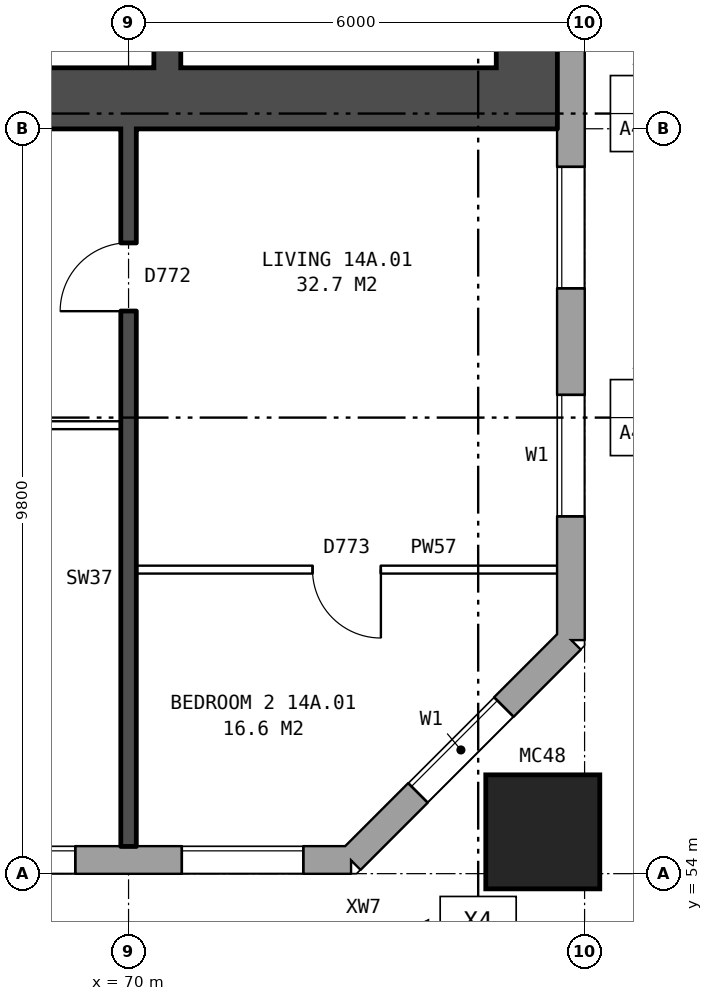
"""IFC4 building model, lengths in metres.
Left out: names, types, materials, properties, quantities, classifications, styles, units other than length and angle.
Written with IfcOpenShell. Run it as: python <this file> out.ifc"""

import sys

from ifc_helpers import new_model, si_unit, direction, frame, frame_2d, origin, origin_2d, place, context, subcontext, project, spatial, rectangle, hollow_rectangle, extrude, element, fill, save


model = new_model("IFC4")
c1 = context("Model", 3, precision=1e-05, world=origin(), true_north=direction((0.0, 1.0)))
c2 = subcontext(c1, "Body", "Model", "MODEL_VIEW")
j1 = project(units=[si_unit("LENGTHUNIT", "METRE"), si_unit("PLANEANGLEUNIT", "RADIAN")], contexts=[c1])
p1 = place(None, origin())
s1 = spatial("IfcSite", under=j1, at=p1, CompositionType="ELEMENT")
p2 = place(p1, origin())
s2 = spatial("IfcBuilding", under=s1, at=p2, CompositionType="ELEMENT")
p3 = place(p2, frame((0.0, 0.0, 53.6)))
s3 = spatial("IfcBuildingStorey", under=s2, at=p3, CompositionType="ELEMENT", Elevation=53.6)
p4 = place(p3, frame((75.45, 54.55, 0.0), z_axis=(0.0, 0.0, 1.0), x_axis=(1.0, 0.0, 0.0)))
e1 = element("IfcColumn", 1, at=p4, inside=s3, PredefinedType="COLUMN", context=c2, shape_type="SweptSolid", body=[
    extrude(hollow_rectangle(XDim=1.5, YDim=1.5, WallThickness=0.08, at=origin_2d()), origin(), (0.0, 0.0, 1.0), 3.1),
])
p5 = place(p3, frame((24.575, 54.18, 0.0), z_axis=(0.0, 0.0, 1.0), x_axis=(1.0, 0.0, 0.0)))
e2 = element("IfcWall", 2, at=p5, inside=s3, PredefinedType="STANDARD", context=c2, shape_type="SweptSolid", body=[
    extrude(rectangle(XDim=48.351, YDim=0.36, at=frame_2d((24.175, 0.0))), origin(), (0.0, 0.0, 1.0), 2.85),
])
p6 = place(p5, frame((1.125, 0.0, 0.8)))
e3 = element("IfcOpeningElement", 3, at=p6, cuts=e2, PredefinedType="OPENING", context=c2, shape_type="SweptSolid", body=[
    extrude(rectangle(XDim=1.6, YDim=1.8, at=frame_2d((0.8, 0.9))), frame((0.0, 0.19, 0.0), z_axis=(0.0, -1.0, 0.0), x_axis=(1.0, 0.0, 0.0)), (0.0, 0.0, 1.0), 0.38),
])
p7 = place(p5, frame((4.125, 0.0, 0.8)))
e4 = element("IfcOpeningElement", 4, at=p7, cuts=e2, PredefinedType="OPENING", context=c2, shape_type="SweptSolid", body=[
    extrude(rectangle(XDim=1.6, YDim=1.8, at=frame_2d((0.8, 0.9))), frame((0.0, 0.19, 0.0), z_axis=(0.0, -1.0, 0.0), x_axis=(1.0, 0.0, 0.0)), (0.0, 0.0, 1.0), 0.38),
])
p8 = place(p5, frame((7.125, 0.0, 0.8)))
e5 = element("IfcOpeningElement", 5, at=p8, cuts=e2, PredefinedType="OPENING", context=c2, shape_type="SweptSolid", body=[
    extrude(rectangle(XDim=1.6, YDim=1.8, at=frame_2d((0.8, 0.9))), frame((0.0, 0.19, 0.0), z_axis=(0.0, -1.0, 0.0), x_axis=(1.0, 0.0, 0.0)), (0.0, 0.0, 1.0), 0.38),
])
p9 = place(p5, frame((10.125, 0.0, 0.8)))
e6 = element("IfcOpeningElement", 6, at=p9, cuts=e2, PredefinedType="OPENING", context=c2, shape_type="SweptSolid", body=[
    extrude(rectangle(XDim=1.6, YDim=1.8, at=frame_2d((0.8, 0.9))), frame((0.0, 0.19, 0.0), z_axis=(0.0, -1.0, 0.0), x_axis=(1.0, 0.0, 0.0)), (0.0, 0.0, 1.0), 0.38),
])
p10 = place(p5, frame((12.025, 0.0, 1.7)))
e7 = element("IfcOpeningElement", 7, at=p10, cuts=e2, PredefinedType="OPENING", context=c2, shape_type="SweptSolid", body=[
    extrude(rectangle(XDim=0.8, YDim=0.9, at=frame_2d((0.4, 0.45))), frame((0.0, 0.19, 0.0), z_axis=(0.0, -1.0, 0.0), x_axis=(1.0, 0.0, 0.0)), (0.0, 0.0, 1.0), 0.38),
])
p11 = place(p5, frame((16.125, 0.0, 0.8)))
e8 = element("IfcOpeningElement", 8, at=p11, cuts=e2, PredefinedType="OPENING", context=c2, shape_type="SweptSolid", body=[
    extrude(rectangle(XDim=1.6, YDim=1.8, at=frame_2d((0.8, 0.9))), frame((0.0, 0.19, 0.0), z_axis=(0.0, -1.0, 0.0), x_axis=(1.0, 0.0, 0.0)), (0.0, 0.0, 1.0), 0.38),
])
p12 = place(p5, frame((19.125, 0.0, 0.8)))
e9 = element("IfcOpeningElement", 9, at=p12, cuts=e2, PredefinedType="OPENING", context=c2, shape_type="SweptSolid", body=[
    extrude(rectangle(XDim=1.6, YDim=1.8, at=frame_2d((0.8, 0.9))), frame((0.0, 0.19, 0.0), z_axis=(0.0, -1.0, 0.0), x_axis=(1.0, 0.0, 0.0)), (0.0, 0.0, 1.0), 0.38),
])
p13 = place(p5, frame((22.125, 0.0, 0.8)))
e10 = element("IfcOpeningElement", 10, at=p13, cuts=e2, PredefinedType="OPENING", context=c2, shape_type="SweptSolid", body=[
    extrude(rectangle(XDim=1.6, YDim=1.8, at=frame_2d((0.8, 0.9))), frame((0.0, 0.19, 0.0), z_axis=(0.0, -1.0, 0.0), x_axis=(1.0, 0.0, 0.0)), (0.0, 0.0, 1.0), 0.38),
])
p14 = place(p5, frame((25.125, 0.0, 0.8)))
e11 = element("IfcOpeningElement", 11, at=p14, cuts=e2, PredefinedType="OPENING", context=c2, shape_type="SweptSolid", body=[
    extrude(rectangle(XDim=1.6, YDim=1.8, at=frame_2d((0.8, 0.9))), frame((0.0, 0.19, 0.0), z_axis=(0.0, -1.0, 0.0), x_axis=(1.0, 0.0, 0.0)), (0.0, 0.0, 1.0), 0.38),
])
p15 = place(p5, frame((28.125, 0.0, 0.8)))
e12 = element("IfcOpeningElement", 12, at=p15, cuts=e2, PredefinedType="OPENING", context=c2, shape_type="SweptSolid", body=[
    extrude(rectangle(XDim=1.6, YDim=1.8, at=frame_2d((0.8, 0.9))), frame((0.0, 0.19, 0.0), z_axis=(0.0, -1.0, 0.0), x_axis=(1.0, 0.0, 0.0)), (0.0, 0.0, 1.0), 0.38),
])
p16 = place(p5, frame((31.125, 0.0, 0.8)))
e13 = element("IfcOpeningElement", 13, at=p16, cuts=e2, PredefinedType="OPENING", context=c2, shape_type="SweptSolid", body=[
    extrude(rectangle(XDim=1.6, YDim=1.8, at=frame_2d((0.8, 0.9))), frame((0.0, 0.19, 0.0), z_axis=(0.0, -1.0, 0.0), x_axis=(1.0, 0.0, 0.0)), (0.0, 0.0, 1.0), 0.38),
])
p17 = place(p5, frame((33.625, 0.0, 0.15)))
e14 = element("IfcOpeningElement", 14, at=p17, cuts=e2, PredefinedType="OPENING", context=c2, shape_type="SweptSolid", body=[
    extrude(rectangle(XDim=1.4, YDim=0.9, at=frame_2d((0.7, 0.45))), frame((0.0, 0.19, 0.0), z_axis=(0.0, -1.0, 0.0), x_axis=(1.0, 0.0, 0.0)), (0.0, 0.0, 1.0), 0.38),
])
p18 = place(p5, frame((37.125, 0.0, 0.8)))
e15 = element("IfcOpeningElement", 15, at=p18, cuts=e2, PredefinedType="OPENING", context=c2, shape_type="SweptSolid", body=[
    extrude(rectangle(XDim=1.6, YDim=1.8, at=frame_2d((0.8, 0.9))), frame((0.0, 0.19, 0.0), z_axis=(0.0, -1.0, 0.0), x_axis=(1.0, 0.0, 0.0)), (0.0, 0.0, 1.0), 0.38),
])
p19 = place(p5, frame((40.125, 0.0, 0.8)))
e16 = element("IfcOpeningElement", 16, at=p19, cuts=e2, PredefinedType="OPENING", context=c2, shape_type="SweptSolid", body=[
    extrude(rectangle(XDim=1.6, YDim=1.8, at=frame_2d((0.8, 0.9))), frame((0.0, 0.19, 0.0), z_axis=(0.0, -1.0, 0.0), x_axis=(1.0, 0.0, 0.0)), (0.0, 0.0, 1.0), 0.38),
])
p20 = place(p5, frame((43.125, 0.0, 0.8)))
e17 = element("IfcOpeningElement", 17, at=p20, cuts=e2, PredefinedType="OPENING", context=c2, shape_type="SweptSolid", body=[
    extrude(rectangle(XDim=1.6, YDim=1.8, at=frame_2d((0.8, 0.9))), frame((0.0, 0.19, 0.0), z_axis=(0.0, -1.0, 0.0), x_axis=(1.0, 0.0, 0.0)), (0.0, 0.0, 1.0), 0.38),
])
p21 = place(p5, frame((46.125, 0.0, 0.8)))
e18 = element("IfcOpeningElement", 18, at=p21, cuts=e2, PredefinedType="OPENING", context=c2, shape_type="SweptSolid", body=[
    extrude(rectangle(XDim=1.6, YDim=1.8, at=frame_2d((0.8, 0.9))), frame((0.0, 0.19, 0.0), z_axis=(0.0, -1.0, 0.0), x_axis=(1.0, 0.0, 0.0)), (0.0, 0.0, 1.0), 0.38),
])
p22 = place(p5, frame((14.325, 0.0, 0.8)))
e19 = element("IfcOpeningElement", 19, at=p22, cuts=e2, PredefinedType="OPENING", context=c2, shape_type="SweptSolid", body=[
    extrude(rectangle(XDim=0.8, YDim=0.9, at=frame_2d((0.4, 0.45))), frame((0.0, 0.19, 0.0), z_axis=(0.0, -1.0, 0.0), x_axis=(1.0, 0.0, 0.0)), (0.0, 0.0, 1.0), 0.38),
])
p23 = place(p5, frame((35.525, 0.0, 1.65)))
e20 = element("IfcOpeningElement", 20, at=p23, cuts=e2, PredefinedType="OPENING", context=c2, shape_type="SweptSolid", body=[
    extrude(rectangle(XDim=0.6, YDim=0.9, at=frame_2d((0.3, 0.45))), frame((0.0, 0.19, 0.0), z_axis=(0.0, -1.0, 0.0), x_axis=(1.0, 0.0, 0.0)), (0.0, 0.0, 1.0), 0.38),
])
p24 = place(p3, frame((72.925, 54.18, 0.0), z_axis=(0.0, 0.0, 1.0), x_axis=(0.707106781187, 0.707106781187, 0.0)))
e21 = element("IfcWall", 21, at=p24, inside=s3, PredefinedType="STANDARD", context=c2, shape_type="SweptSolid", body=[
    extrude(rectangle(XDim=4.094, YDim=0.36, at=frame_2d((2.047, 0.0))), origin(), (0.0, 0.0, 1.0), 2.85),
])
p25 = place(p24, frame((1.247, 0.0, 0.8)))
e22 = element("IfcOpeningElement", 22, at=p25, cuts=e21, PredefinedType="OPENING", context=c2, shape_type="SweptSolid", body=[
    extrude(rectangle(XDim=1.6, YDim=1.8, at=frame_2d((0.8, 0.9))), frame((0.0, 0.19, 0.0), z_axis=(0.0, -1.0, 0.0), x_axis=(1.0, 0.0, 0.0)), (0.0, 0.0, 1.0), 0.38),
])
p26 = place(p3, frame((75.82, 57.075, 0.0), z_axis=(0.0, 0.0, 1.0), x_axis=(0.0, 1.0, 0.0)))
e23 = element("IfcWall", 23, at=p26, inside=s3, PredefinedType="STANDARD", context=c2, shape_type="SweptSolid", body=[
    extrude(rectangle(XDim=25.851, YDim=0.36, at=frame_2d((12.925, 0.0))), origin(), (0.0, 0.0, 1.0), 2.85),
])
p27 = place(p26, frame((1.625, 0.0, 0.8)))
e24 = element("IfcOpeningElement", 24, at=p27, cuts=e23, PredefinedType="OPENING", context=c2, shape_type="SweptSolid", body=[
    extrude(rectangle(XDim=1.6, YDim=1.8, at=frame_2d((0.8, 0.9))), frame((0.0, 0.19, 0.0), z_axis=(0.0, -1.0, 0.0), x_axis=(1.0, 0.0, 0.0)), (0.0, 0.0, 1.0), 0.38),
])
p28 = place(p26, frame((4.625, 0.0, 0.8)))
e25 = element("IfcOpeningElement", 25, at=p28, cuts=e23, PredefinedType="OPENING", context=c2, shape_type="SweptSolid", body=[
    extrude(rectangle(XDim=1.6, YDim=1.8, at=frame_2d((0.8, 0.9))), frame((0.0, 0.19, 0.0), z_axis=(0.0, -1.0, 0.0), x_axis=(1.0, 0.0, 0.0)), (0.0, 0.0, 1.0), 0.38),
])
p29 = place(p26, frame((19.625, 0.0, 0.8)))
e26 = element("IfcOpeningElement", 26, at=p29, cuts=e23, PredefinedType="OPENING", context=c2, shape_type="SweptSolid", body=[
    extrude(rectangle(XDim=1.6, YDim=1.8, at=frame_2d((0.8, 0.9))), frame((0.0, 0.19, 0.0), z_axis=(0.0, -1.0, 0.0), x_axis=(1.0, 0.0, 0.0)), (0.0, 0.0, 1.0), 0.38),
])
p30 = place(p26, frame((22.625, 0.0, 0.8)))
e27 = element("IfcOpeningElement", 27, at=p30, cuts=e23, PredefinedType="OPENING", context=c2, shape_type="SweptSolid", body=[
    extrude(rectangle(XDim=1.6, YDim=1.8, at=frame_2d((0.8, 0.9))), frame((0.0, 0.19, 0.0), z_axis=(0.0, -1.0, 0.0), x_axis=(1.0, 0.0, 0.0)), (0.0, 0.0, 1.0), 0.38),
])
p31 = place(p3, frame((75.24, 64.6, 0.0), z_axis=(0.0, 0.0, 1.0), x_axis=(0.0, 1.0, 0.0)))
e28 = element("IfcWall", 28, at=p31, inside=s3, PredefinedType="SHEAR", context=c2, shape_type="SweptSolid", body=[
    extrude(rectangle(XDim=10.8, YDim=0.8, at=frame_2d((5.4, 0.0))), origin(), (0.0, 0.0, 1.0), 2.85),
])
p32 = place(p3, frame((66.64, 64.2, 0.0), z_axis=(0.0, 0.0, 1.0), x_axis=(1.0, 0.0, 0.0)))
e29 = element("IfcWall", 29, at=p32, inside=s3, PredefinedType="SHEAR", context=c2, shape_type="SweptSolid", body=[
    extrude(rectangle(XDim=9.0, YDim=0.8, at=frame_2d((4.5, 0.0))), origin(), (0.0, 0.0, 1.0), 2.85),
])
p33 = place(p3, frame((70.51, 64.6, 0.0), z_axis=(0.0, 0.0, 1.0), x_axis=(0.0, 1.0, 0.0)))
e30 = element("IfcWall", 30, at=p33, inside=s3, PredefinedType="SHEAR", context=c2, shape_type="SweptSolid", body=[
    extrude(rectangle(XDim=2.075, YDim=0.35, at=frame_2d((1.038, 0.0))), origin(), (0.0, 0.0, 1.0), 2.85),
])
p34 = place(p3, frame((70.1, 58.0, 0.0), z_axis=(0.0, 0.0, 1.0), x_axis=(1.0, 0.0, 0.0)))
e31 = element("IfcWall", 31, at=p34, inside=s3, PredefinedType="PARTITIONING", context=c2, shape_type="SweptSolid", body=[
    extrude(rectangle(XDim=5.54, YDim=0.1, at=frame_2d((2.77, 0.0))), origin(), (0.0, 0.0, 1.0), 2.85),
])
p35 = place(p34, frame((2.32, 0.0, 0.0)))
e32 = element("IfcOpeningElement", 32, at=p35, cuts=e31, PredefinedType="OPENING", context=c2, shape_type="SweptSolid", body=[
    extrude(rectangle(XDim=0.9, YDim=2.1, at=frame_2d((0.45, 1.05))), frame((0.0, 0.06, 0.0), z_axis=(0.0, -1.0, 0.0), x_axis=(1.0, 0.0, 0.0)), (0.0, 0.0, 1.0), 0.12),
])
p36 = place(p3, frame((64.1, 59.9, 0.0), z_axis=(0.0, 0.0, 1.0), x_axis=(1.0, 0.0, 0.0)))
e33 = element("IfcWall", 33, at=p36, inside=s3, PredefinedType="PARTITIONING", context=c2, shape_type="SweptSolid", body=[
    extrude(rectangle(XDim=5.8, YDim=0.1, at=frame_2d((2.9, 0.0))), origin(), (0.0, 0.0, 1.0), 2.85),
])
p37 = place(p36, frame((3.6, 0.0, 0.0)))
e34 = element("IfcOpeningElement", 34, at=p37, cuts=e33, PredefinedType="OPENING", context=c2, shape_type="SweptSolid", body=[
    extrude(rectangle(XDim=0.9, YDim=2.1, at=frame_2d((0.45, 1.05))), frame((0.0, 0.06, 0.0), z_axis=(0.0, -1.0, 0.0), x_axis=(1.0, 0.0, 0.0)), (0.0, 0.0, 1.0), 0.12),
])
p38 = place(p36, frame((0.7, 0.0, 0.0)))
e35 = element("IfcOpeningElement", 35, at=p38, cuts=e33, PredefinedType="OPENING", context=c2, shape_type="SweptSolid", body=[
    extrude(rectangle(XDim=0.9, YDim=2.1, at=frame_2d((0.45, 1.05))), frame((0.0, 0.06, 0.0), z_axis=(0.0, -1.0, 0.0), x_axis=(1.0, 0.0, 0.0)), (0.0, 0.0, 1.0), 0.12),
])
p39 = place(p3, frame((70.0, 54.36, 0.0), z_axis=(0.0, 0.0, 1.0), x_axis=(0.0, 1.0, 0.0)))
e36 = element("IfcWall", 36, at=p39, inside=s3, PredefinedType="SOLIDWALL", context=c2, shape_type="SweptSolid", body=[
    extrude(rectangle(XDim=9.44, YDim=0.2, at=frame_2d((4.72, 0.0))), origin(), (0.0, 0.0, 1.0), 2.85),
])
p40 = place(p39, frame((7.04, 0.0, 0.0)))
e37 = element("IfcOpeningElement", 37, at=p40, cuts=e36, PredefinedType="OPENING", context=c2, shape_type="SweptSolid", body=[
    extrude(rectangle(XDim=0.9, YDim=2.1, at=frame_2d((0.45, 1.05))), frame((0.0, 0.11, 0.0), z_axis=(0.0, -1.0, 0.0), x_axis=(1.0, 0.0, 0.0)), (0.0, 0.0, 1.0), 0.22),
])
p41 = place(p20, origin())
e38 = element("IfcWindow", 38, at=p41, inside=s3, PartitioningType="SINGLE_PANEL", PredefinedType="WINDOW", context=c2, shape_type="SweptSolid", body=[
    extrude(rectangle(XDim=1.6, YDim=1.8, at=frame_2d((0.8, 0.9))), frame((0.0, 0.15, 0.0), z_axis=(0.0, -1.0, 0.0), x_axis=(1.0, 0.0, 0.0)), (0.0, 0.0, 1.0), 0.06),
])
fill(e17, e38)
p42 = place(p21, origin())
e39 = element("IfcWindow", 39, at=p42, inside=s3, PartitioningType="SINGLE_PANEL", PredefinedType="WINDOW", context=c2, shape_type="SweptSolid", body=[
    extrude(rectangle(XDim=1.6, YDim=1.8, at=frame_2d((0.8, 0.9))), frame((0.0, 0.15, 0.0), z_axis=(0.0, -1.0, 0.0), x_axis=(1.0, 0.0, 0.0)), (0.0, 0.0, 1.0), 0.06),
])
fill(e18, e39)
p43 = place(p25, origin())
e40 = element("IfcWindow", 40, at=p43, inside=s3, PartitioningType="SINGLE_PANEL", PredefinedType="WINDOW", context=c2, shape_type="SweptSolid", body=[
    extrude(rectangle(XDim=1.6, YDim=1.8, at=frame_2d((0.8, 0.9))), frame((0.0, 0.15, 0.0), z_axis=(0.0, -1.0, 0.0), x_axis=(1.0, 0.0, 0.0)), (0.0, 0.0, 1.0), 0.06),
])
fill(e22, e40)
p44 = place(p27, origin())
e41 = element("IfcWindow", 41, at=p44, inside=s3, PartitioningType="SINGLE_PANEL", PredefinedType="WINDOW", context=c2, shape_type="SweptSolid", body=[
    extrude(rectangle(XDim=1.6, YDim=1.8, at=frame_2d((0.8, 0.9))), frame((0.0, 0.15, 0.0), z_axis=(0.0, -1.0, 0.0), x_axis=(1.0, 0.0, 0.0)), (0.0, 0.0, 1.0), 0.06),
])
fill(e24, e41)
p45 = place(p28, origin())
e42 = element("IfcWindow", 42, at=p45, inside=s3, PartitioningType="SINGLE_PANEL", PredefinedType="WINDOW", context=c2, shape_type="SweptSolid", body=[
    extrude(rectangle(XDim=1.6, YDim=1.8, at=frame_2d((0.8, 0.9))), frame((0.0, 0.15, 0.0), z_axis=(0.0, -1.0, 0.0), x_axis=(1.0, 0.0, 0.0)), (0.0, 0.0, 1.0), 0.06),
])
fill(e25, e42)
p46 = place(p35, frame((0.9, 0.0, 0.0), z_axis=(0.0, 0.0, 1.0), x_axis=(-1.0, 0.0, 0.0)))
e43 = element("IfcDoor", 43, at=p46, inside=s3, OperationType="SINGLE_SWING_LEFT", PredefinedType="DOOR", context=c2, shape_type="SweptSolid", body=[
    extrude(rectangle(XDim=0.9, YDim=2.1, at=frame_2d((0.45, 1.05))), frame((0.0, 0.025, 0.0), z_axis=(0.0, -1.0, 0.0), x_axis=(1.0, 0.0, 0.0)), (0.0, 0.0, 1.0), 0.05),
])
fill(e32, e43)
p47 = place(p40, origin())
e44 = element("IfcDoor", 44, at=p47, inside=s3, OperationType="SINGLE_SWING_LEFT", PredefinedType="DOOR", context=c2, shape_type="SweptSolid", body=[
    extrude(rectangle(XDim=0.9, YDim=2.1, at=frame_2d((0.45, 1.05))), frame((0.0, 0.025, 0.0), z_axis=(0.0, -1.0, 0.0), x_axis=(1.0, 0.0, 0.0)), (0.0, 0.0, 1.0), 0.05),
])
fill(e37, e44)
save(model, sys.argv[1])
